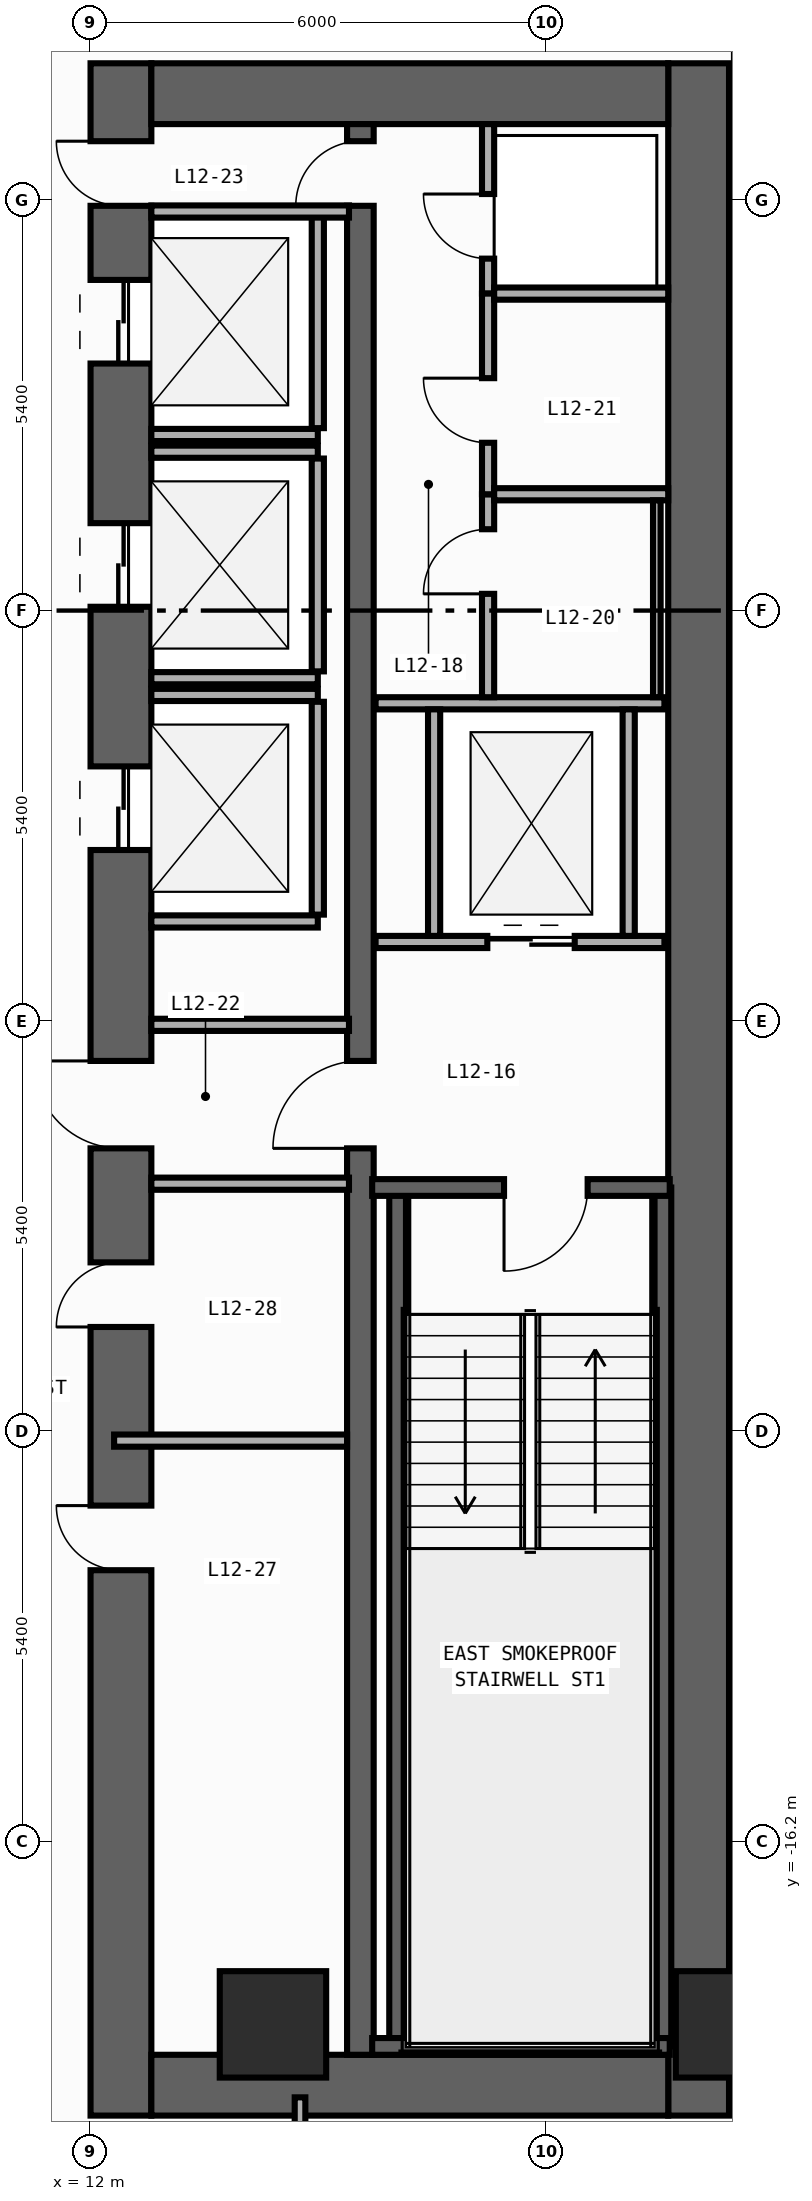
"""IFC4 building model, lengths in metres.
Left out: names, types, materials, properties, quantities, classifications, styles, units other than length and angle.
Written with IfcOpenShell. Run it as: python <this file> out.ifc"""

import sys

from ifc_helpers import new_model, si_unit, direction, frame, frame_2d, origin, origin_2d, place, context, subcontext, project, spatial, rectangle, extrude, element, fill, save


model = new_model("IFC4")
c1 = context("Model", 3, precision=1e-05, world=origin(), true_north=direction((0.0, 1.0)))
c2 = subcontext(c1, "Body", "Model", "MODEL_VIEW")
j1 = project(units=[si_unit("LENGTHUNIT", "METRE"), si_unit("PLANEANGLEUNIT", "RADIAN")], contexts=[c1])
p1 = place(None, origin())
s1 = spatial("IfcSite", under=j1, at=p1, CompositionType="ELEMENT")
p2 = place(p1, origin())
s2 = spatial("IfcBuilding", under=s1, at=p2, CompositionType="ELEMENT")
p3 = place(p2, frame((0.0, 0.0, 51.2)))
s3 = spatial("IfcBuildingStorey", under=s2, at=p3, CompositionType="ELEMENT", Elevation=51.2)
p4 = place(p3, frame((12.4, -19.8, 0.0), z_axis=(0.0, 0.0, 1.0), x_axis=(0.0, 1.0, 0.0)))
e1 = element("IfcWall", 1, at=p4, inside=s3, PredefinedType="SHEAR", context=c2, shape_type="SweptSolid", body=[
    extrude(rectangle(XDim=27.0, YDim=0.8, at=frame_2d((13.5, 0.0))), origin(), (0.0, 0.0, 1.0), 3.94),
])
p5 = place(p4, frame((23.05, 0.0, 0.0)))
e2 = element("IfcOpeningElement", 2, at=p5, cuts=e1, PredefinedType="OPENING", context=c2, shape_type="SweptSolid", body=[
    extrude(rectangle(XDim=1.1, YDim=2.2, at=frame_2d((0.55, 1.1))), frame((0.0, 0.41, 0.0), z_axis=(0.0, -1.0, 0.0), x_axis=(1.0, 0.0, 0.0)), (0.0, 0.0, 1.0), 0.82),
])
p6 = place(p4, frame((19.85, 0.0, 0.0)))
e3 = element("IfcOpeningElement", 3, at=p6, cuts=e1, PredefinedType="OPENING", context=c2, shape_type="SweptSolid", body=[
    extrude(rectangle(XDim=1.1, YDim=2.2, at=frame_2d((0.55, 1.1))), frame((0.0, 0.41, 0.0), z_axis=(0.0, -1.0, 0.0), x_axis=(1.0, 0.0, 0.0)), (0.0, 0.0, 1.0), 0.82),
])
p7 = place(p4, frame((16.65, 0.0, 0.0)))
e4 = element("IfcOpeningElement", 4, at=p7, cuts=e1, PredefinedType="OPENING", context=c2, shape_type="SweptSolid", body=[
    extrude(rectangle(XDim=1.1, YDim=2.2, at=frame_2d((0.55, 1.1))), frame((0.0, 0.41, 0.0), z_axis=(0.0, -1.0, 0.0), x_axis=(1.0, 0.0, 0.0)), (0.0, 0.0, 1.0), 0.82),
])
p8 = place(p4, frame((7.175, 0.0, 0.0)))
e5 = element("IfcOpeningElement", 5, at=p8, cuts=e1, PredefinedType="OPENING", context=c2, shape_type="SweptSolid", body=[
    extrude(rectangle(XDim=0.85, YDim=2.1, at=frame_2d((0.425, 1.05))), frame((0.0, 0.41, 0.0), z_axis=(0.0, -1.0, 0.0), x_axis=(1.0, 0.0, 0.0)), (0.0, 0.0, 1.0), 0.82),
])
p9 = place(p4, frame((10.375, 0.0, 0.0)))
e6 = element("IfcOpeningElement", 6, at=p9, cuts=e1, PredefinedType="OPENING", context=c2, shape_type="SweptSolid", body=[
    extrude(rectangle(XDim=0.85, YDim=2.1, at=frame_2d((0.425, 1.05))), frame((0.0, 0.41, 0.0), z_axis=(0.0, -1.0, 0.0), x_axis=(1.0, 0.0, 0.0)), (0.0, 0.0, 1.0), 0.82),
])
p10 = place(p4, frame((12.725, 0.0, 0.0)))
e7 = element("IfcOpeningElement", 7, at=p10, cuts=e1, PredefinedType="OPENING", context=c2, shape_type="SweptSolid", body=[
    extrude(rectangle(XDim=1.15, YDim=2.2, at=frame_2d((0.575, 1.1))), frame((0.0, 0.41, 0.0), z_axis=(0.0, -1.0, 0.0), x_axis=(1.0, 0.0, 0.0)), (0.0, 0.0, 1.0), 0.82),
])
p11 = place(p4, frame((25.125, 0.0, 0.0)))
e8 = element("IfcOpeningElement", 8, at=p11, cuts=e1, PredefinedType="OPENING", context=c2, shape_type="SweptSolid", body=[
    extrude(rectangle(XDim=0.85, YDim=2.1, at=frame_2d((0.425, 1.05))), frame((0.0, 0.41, 0.0), z_axis=(0.0, -1.0, 0.0), x_axis=(1.0, 0.0, 0.0)), (0.0, 0.0, 1.0), 0.82),
])
p12 = place(p3, frame((20.0, -19.8, 0.0), z_axis=(0.0, 0.0, 1.0), x_axis=(0.0, 1.0, 0.0)))
e9 = element("IfcWall", 9, at=p12, inside=s3, PredefinedType="SHEAR", context=c2, shape_type="SweptSolid", body=[
    extrude(rectangle(XDim=27.0, YDim=0.8, at=frame_2d((13.5, 0.0))), origin(), (0.0, 0.0, 1.0), 3.94),
])
for number, where, z_axis, x_axis in (
    (10, (12.8, -19.4, 0.0), (0.0, 0.0, 1.0), (1.0, 0.0, 0.0)),
    (11, (12.8, 6.8, 0.0), (0.0, 0.0, 1.0), (1.0, 0.0, 0.0)),
):
    element("IfcWall", number, at=place(p3, frame(where, z_axis=z_axis, x_axis=x_axis)), inside=s3, PredefinedType="SHEAR", context=c2, shape_type="SweptSolid", body=[
        extrude(rectangle(XDim=6.8, YDim=0.8, at=frame_2d((3.4, 0.0))), origin(), (0.0, 0.0, 1.0), 3.94),
    ])
p13 = place(p3, frame((15.55, -19.0, 0.0), z_axis=(0.0, 0.0, 1.0), x_axis=(0.0, 1.0, 0.0)))
e12 = element("IfcWall", 12, at=p13, inside=s3, PredefinedType="SHEAR", context=c2, shape_type="SweptSolid", body=[
    extrude(rectangle(XDim=25.4, YDim=0.35, at=frame_2d((12.7, 0.0))), origin(), (0.0, 0.0, 1.0), 3.94),
])
p14 = place(p13, frame((11.925, 0.0, 0.0)))
e13 = element("IfcOpeningElement", 13, at=p14, cuts=e12, PredefinedType="OPENING", context=c2, shape_type="SweptSolid", body=[
    extrude(rectangle(XDim=1.15, YDim=2.2, at=frame_2d((0.575, 1.1))), frame((0.0, 0.185, 0.0), z_axis=(0.0, -1.0, 0.0), x_axis=(1.0, 0.0, 0.0)), (0.0, 0.0, 1.0), 0.37),
])
p15 = place(p13, frame((24.325, 0.0, 0.0)))
e14 = element("IfcOpeningElement", 14, at=p15, cuts=e12, PredefinedType="OPENING", context=c2, shape_type="SweptSolid", body=[
    extrude(rectangle(XDim=0.85, YDim=2.1, at=frame_2d((0.425, 1.05))), frame((0.0, 0.185, 0.0), z_axis=(0.0, -1.0, 0.0), x_axis=(1.0, 0.0, 0.0)), (0.0, 0.0, 1.0), 0.37),
])
for number, where, z_axis, x_axis in (
    (15, (16.04, -18.89, 0.0), (0.0, 0.0, 1.0), (0.0, 1.0, 0.0)),
    (16, (19.53, -18.89, 0.0), (0.0, 0.0, 1.0), (0.0, 1.0, 0.0)),
):
    element("IfcWall", number, at=place(p3, frame(where, z_axis=z_axis, x_axis=x_axis)), inside=s3, PredefinedType="SHEAR", context=c2, shape_type="SweptSolid", body=[
        extrude(rectangle(XDim=11.3, YDim=0.22, at=frame_2d((5.65, 0.0))), origin(), (0.0, 0.0, 1.0), 3.94),
    ])
p16 = place(p3, frame((15.705, -18.89, 0.0), z_axis=(0.0, 0.0, 1.0), x_axis=(1.0, 0.0, 0.0)))
e17 = element("IfcWall", 17, at=p16, inside=s3, PredefinedType="SHEAR", context=c2, shape_type="SweptSolid", body=[
    extrude(rectangle(XDim=3.915, YDim=0.22, at=frame_2d((1.958, 0.0))), origin(), (0.0, 0.0, 1.0), 3.94),
])
p17 = place(p3, frame((19.62, -7.59, 0.0), z_axis=(0.0, 0.0, 1.0), x_axis=(-1.0, 0.0, 0.0)))
e18 = element("IfcWall", 18, at=p17, inside=s3, PredefinedType="SHEAR", context=c2, shape_type="SweptSolid", body=[
    extrude(rectangle(XDim=3.915, YDim=0.22, at=frame_2d((1.958, 0.0))), origin(), (0.0, 0.0, 1.0), 3.94),
])
p18 = place(p17, frame((1.08, 0.0, 0.0)))
e19 = element("IfcOpeningElement", 19, at=p18, cuts=e18, PredefinedType="OPENING", context=c2, shape_type="SweptSolid", body=[
    extrude(rectangle(XDim=1.1, YDim=2.2, at=frame_2d((0.55, 1.1))), frame((0.0, 0.12, 0.0), z_axis=(0.0, -1.0, 0.0), x_axis=(1.0, 0.0, 0.0)), (0.0, 0.0, 1.0), 0.24),
])
for number, where, z_axis, x_axis in (
    (20, (20.4, -18.6, 0.0), (0.0, 0.0, 1.0), (1.0, 0.0, 0.0)),
    (21, (14.4, -18.6, 0.0), (0.0, 0.0, 1.0), (1.0, 0.0, 0.0)),
):
    element("IfcColumn", number, at=place(p3, frame(where, z_axis=z_axis, x_axis=x_axis)), inside=s3, PredefinedType="COLUMN", context=c2, shape_type="SweptSolid", body=[
        extrude(rectangle(XDim=1.4, YDim=1.4, at=origin_2d()), origin(), (0.0, 0.0, 1.0), 4.2),
    ])
p19 = place(p3, frame((12.8, 2.31, 0.0), z_axis=(0.0, 0.0, 1.0), x_axis=(1.0, 0.0, 0.0)))
e22 = element("IfcWall", 22, at=p19, inside=s3, PredefinedType="STANDARD", context=c2, shape_type="SweptSolid", body=[
    extrude(rectangle(XDim=2.19, YDim=0.16, at=frame_2d((1.095, 0.0))), origin(), (0.0, 0.0, 1.0), 3.94),
])
p20 = place(p3, frame((14.99, 2.4, 0.0), z_axis=(0.0, 0.0, 1.0), x_axis=(0.0, 1.0, 0.0)))
e23 = element("IfcWall", 23, at=p20, inside=s3, PredefinedType="STANDARD", context=c2, shape_type="SweptSolid", body=[
    extrude(rectangle(XDim=2.8, YDim=0.16, at=frame_2d((1.4, 0.0))), origin(), (0.0, 0.0, 1.0), 3.94),
])
for number, where, z_axis, x_axis in (
    (24, (12.8, -0.89, 0.0), (0.0, 0.0, 1.0), (1.0, 0.0, 0.0)),
    (25, (12.8, 2.09, 0.0), (0.0, 0.0, 1.0), (1.0, 0.0, 0.0)),
):
    element("IfcWall", number, at=place(p3, frame(where, z_axis=z_axis, x_axis=x_axis)), inside=s3, PredefinedType="STANDARD", context=c2, shape_type="SweptSolid", body=[
        extrude(rectangle(XDim=2.19, YDim=0.16, at=frame_2d((1.095, 0.0))), origin(), (0.0, 0.0, 1.0), 3.94),
    ])
p21 = place(p3, frame((14.99, -0.8, 0.0), z_axis=(0.0, 0.0, 1.0), x_axis=(0.0, 1.0, 0.0)))
e26 = element("IfcWall", 26, at=p21, inside=s3, PredefinedType="STANDARD", context=c2, shape_type="SweptSolid", body=[
    extrude(rectangle(XDim=2.8, YDim=0.16, at=frame_2d((1.4, 0.0))), origin(), (0.0, 0.0, 1.0), 3.94),
])
for number, where, z_axis, x_axis in (
    (27, (12.8, -4.09, 0.0), (0.0, 0.0, 1.0), (1.0, 0.0, 0.0)),
    (28, (12.8, -1.11, 0.0), (0.0, 0.0, 1.0), (1.0, 0.0, 0.0)),
):
    element("IfcWall", number, at=place(p3, frame(where, z_axis=z_axis, x_axis=x_axis)), inside=s3, PredefinedType="STANDARD", context=c2, shape_type="SweptSolid", body=[
        extrude(rectangle(XDim=2.19, YDim=0.16, at=frame_2d((1.095, 0.0))), origin(), (0.0, 0.0, 1.0), 3.94),
    ])
p22 = place(p3, frame((14.99, -4.0, 0.0), z_axis=(0.0, 0.0, 1.0), x_axis=(0.0, 1.0, 0.0)))
e29 = element("IfcWall", 29, at=p22, inside=s3, PredefinedType="STANDARD", context=c2, shape_type="SweptSolid", body=[
    extrude(rectangle(XDim=2.8, YDim=0.16, at=frame_2d((1.4, 0.0))), origin(), (0.0, 0.0, 1.0), 3.94),
])
p23 = place(p3, frame((15.75, -4.36, 0.0), z_axis=(0.0, 0.0, 1.0), x_axis=(1.0, 0.0, 0.0)))
e30 = element("IfcWall", 30, at=p23, inside=s3, PredefinedType="STANDARD", context=c2, shape_type="SweptSolid", body=[
    extrude(rectangle(XDim=3.8, YDim=0.16, at=frame_2d((1.9, 0.0))), origin(), (0.0, 0.0, 1.0), 3.94),
])
p24 = place(p23, frame((1.47, 0.0, 0.0)))
e31 = element("IfcOpeningElement", 31, at=p24, cuts=e30, PredefinedType="OPENING", context=c2, shape_type="SweptSolid", body=[
    extrude(rectangle(XDim=1.15, YDim=2.2, at=frame_2d((0.575, 1.1))), frame((0.0, 0.09, 0.0), z_axis=(0.0, -1.0, 0.0), x_axis=(1.0, 0.0, 0.0)), (0.0, 0.0, 1.0), 0.18),
])
p25 = place(p3, frame((15.75, -1.22, 0.0), z_axis=(0.0, 0.0, 1.0), x_axis=(1.0, 0.0, 0.0)))
e32 = element("IfcWall", 32, at=p25, inside=s3, PredefinedType="STANDARD", context=c2, shape_type="SweptSolid", body=[
    extrude(rectangle(XDim=3.8, YDim=0.16, at=frame_2d((1.9, 0.0))), origin(), (0.0, 0.0, 1.0), 3.94),
])
for number, where, z_axis, x_axis in (
    (33, (16.52, -4.28, 0.0), (0.0, 0.0, 1.0), (0.0, 1.0, 0.0)),
    (34, (19.08, -4.28, 0.0), (0.0, 0.0, 1.0), (0.0, 1.0, 0.0)),
):
    element("IfcWall", number, at=place(p3, frame(where, z_axis=z_axis, x_axis=x_axis)), inside=s3, PredefinedType="STANDARD", context=c2, shape_type="SweptSolid", body=[
        extrude(rectangle(XDim=2.98, YDim=0.16, at=frame_2d((1.49, 0.0))), origin(), (0.0, 0.0, 1.0), 3.94),
    ])
for number, where, z_axis, x_axis in (
    (35, (12.8, -5.45, 0.0), (0.0, 0.0, 1.0), (1.0, 0.0, 0.0)),
    (36, (12.8, -7.54, 0.0), (0.0, 0.0, 1.0), (1.0, 0.0, 0.0)),
    (37, (12.8, 5.25, 0.0), (0.0, 0.0, 1.0), (1.0, 0.0, 0.0)),
):
    element("IfcWall", number, at=place(p3, frame(where, z_axis=z_axis, x_axis=x_axis)), inside=s3, PredefinedType="STANDARD", context=c2, shape_type="SweptSolid", body=[
        extrude(rectangle(XDim=2.6, YDim=0.16, at=frame_2d((1.3, 0.0))), origin(), (0.0, 0.0, 1.0), 3.94),
    ])
p26 = place(p3, frame((17.23, 4.17, 0.0), z_axis=(0.0, 0.0, 1.0), x_axis=(0.0, 1.0, 0.0)))
e38 = element("IfcWall", 38, at=p26, inside=s3, PredefinedType="PARTITIONING", context=c2, shape_type="SweptSolid", body=[
    extrude(rectangle(XDim=2.23, YDim=0.16, at=frame_2d((1.115, 0.0))), origin(), (0.0, 0.0, 1.0), 3.94),
])
p27 = place(p26, frame((0.46, 0.0, 0.0)))
e39 = element("IfcOpeningElement", 39, at=p27, cuts=e38, PredefinedType="OPENING", context=c2, shape_type="SweptSolid", body=[
    extrude(rectangle(XDim=0.85, YDim=2.1, at=frame_2d((0.425, 1.05))), frame((0.0, 0.09, 0.0), z_axis=(0.0, -1.0, 0.0), x_axis=(1.0, 0.0, 0.0)), (0.0, 0.0, 1.0), 0.18),
])
p28 = place(p3, frame((17.23, -1.14, 0.0), z_axis=(0.0, 0.0, 1.0), x_axis=(0.0, 1.0, 0.0)))
e40 = element("IfcWall", 40, at=p28, inside=s3, PredefinedType="PARTITIONING", context=c2, shape_type="SweptSolid", body=[
    extrude(rectangle(XDim=2.67, YDim=0.16, at=frame_2d((1.335, 0.0))), origin(), (0.0, 0.0, 1.0), 3.94),
])
p29 = place(p28, frame((1.36, 0.0, 0.0)))
e41 = element("IfcOpeningElement", 41, at=p29, cuts=e40, PredefinedType="OPENING", context=c2, shape_type="SweptSolid", body=[
    extrude(rectangle(XDim=0.85, YDim=2.1, at=frame_2d((0.425, 1.05))), frame((0.0, 0.09, 0.0), z_axis=(0.0, -1.0, 0.0), x_axis=(1.0, 0.0, 0.0)), (0.0, 0.0, 1.0), 0.18),
])
p30 = place(p3, frame((17.23, 1.53, 0.0), z_axis=(0.0, 0.0, 1.0), x_axis=(0.0, 1.0, 0.0)))
e42 = element("IfcWall", 42, at=p30, inside=s3, PredefinedType="PARTITIONING", context=c2, shape_type="SweptSolid", body=[
    extrude(rectangle(XDim=2.64, YDim=0.16, at=frame_2d((1.32, 0.0))), origin(), (0.0, 0.0, 1.0), 3.94),
])
p31 = place(p30, frame((0.677, 0.0, 0.0)))
e43 = element("IfcOpeningElement", 43, at=p31, cuts=e42, PredefinedType="OPENING", context=c2, shape_type="SweptSolid", body=[
    extrude(rectangle(XDim=0.85, YDim=2.1, at=frame_2d((0.425, 1.05))), frame((0.0, 0.09, 0.0), z_axis=(0.0, -1.0, 0.0), x_axis=(1.0, 0.0, 0.0)), (0.0, 0.0, 1.0), 0.18),
])
for number, where, z_axis, x_axis in (
    (44, (17.31, 4.17, 0.0), (0.0, 0.0, 1.0), (1.0, 0.0, 0.0)),
    (45, (17.31, 1.53, 0.0), (0.0, 0.0, 1.0), (1.0, 0.0, 0.0)),
):
    element("IfcWall", number, at=place(p3, frame(where, z_axis=z_axis, x_axis=x_axis)), inside=s3, PredefinedType="PARTITIONING", context=c2, shape_type="SweptSolid", body=[
        extrude(rectangle(XDim=2.29, YDim=0.16, at=frame_2d((1.145, 0.0))), origin(), (0.0, 0.0, 1.0), 3.94),
    ])
p32 = place(p3, frame((12.31, -10.92, 0.0), z_axis=(0.0, 0.0, 1.0), x_axis=(1.0, 0.0, 0.0)))
e46 = element("IfcWall", 46, at=p32, inside=s3, PredefinedType="PARTITIONING", context=c2, shape_type="SweptSolid", body=[
    extrude(rectangle(XDim=3.065, YDim=0.16, at=frame_2d((1.532, 0.0))), origin(), (0.0, 0.0, 1.0), 3.14),
])
p33 = place(p3, frame((14.756, -26.693, 0.0), z_axis=(0.0, 0.0, 1.0), x_axis=(0.0, 1.0, 0.0)))
e47 = element("IfcWall", 47, at=p33, inside=s3, PredefinedType="PARTITIONING", context=c2, shape_type="SweptSolid", body=[
    extrude(rectangle(XDim=7.133, YDim=0.14, at=frame_2d((3.567, 0.0))), origin(), (0.0, 0.0, 1.0), 3.94),
])
p34 = place(p33, frame((4.586, 0.0, 0.0)))
e48 = element("IfcOpeningElement", 48, at=p34, cuts=e47, PredefinedType="OPENING", context=c2, shape_type="SweptSolid", body=[
    extrude(rectangle(XDim=0.85, YDim=2.1, at=frame_2d((0.425, 1.05))), frame((0.0, 0.08, 0.0), z_axis=(0.0, -1.0, 0.0), x_axis=(1.0, 0.0, 0.0)), (0.0, 0.0, 1.0), 0.16),
])
p35 = place(p3, frame((19.45, 1.45, 0.0), z_axis=(0.0, 0.0, 1.0), x_axis=(0.0, -1.0, 0.0)))
e49 = element("IfcWall", 49, at=p35, inside=s3, PredefinedType="PARTITIONING", context=c2, shape_type="SweptSolid", body=[
    extrude(rectangle(XDim=2.59, YDim=0.1, at=frame_2d((1.295, 0.0))), origin(), (0.0, 0.0, 1.0), 3.94),
])
p36 = place(p18, origin())
e50 = element("IfcDoor", 50, at=p36, inside=s3, OperationType="SINGLE_SWING_RIGHT", PredefinedType="DOOR", context=c2, shape_type="SweptSolid", body=[
    extrude(rectangle(XDim=1.1, YDim=2.2, at=frame_2d((0.55, 1.1))), frame((0.0, 0.025, 0.0), z_axis=(0.0, -1.0, 0.0), x_axis=(1.0, 0.0, 0.0)), (0.0, 0.0, 1.0), 0.05),
])
fill(e19, e50)
p37 = place(p5, origin())
e51 = element("IfcDoor", 51, at=p37, inside=s3, OperationType="DOUBLE_DOOR_SLIDING", PredefinedType="DOOR", context=c2, shape_type="SweptSolid", body=[
    extrude(rectangle(XDim=1.1, YDim=2.2, at=frame_2d((0.55, 1.1))), frame((0.0, 0.025, 0.0), z_axis=(0.0, -1.0, 0.0), x_axis=(1.0, 0.0, 0.0)), (0.0, 0.0, 1.0), 0.05),
])
fill(e2, e51)
p38 = place(p6, origin())
e52 = element("IfcDoor", 52, at=p38, inside=s3, OperationType="DOUBLE_DOOR_SLIDING", PredefinedType="DOOR", context=c2, shape_type="SweptSolid", body=[
    extrude(rectangle(XDim=1.1, YDim=2.2, at=frame_2d((0.55, 1.1))), frame((0.0, 0.025, 0.0), z_axis=(0.0, -1.0, 0.0), x_axis=(1.0, 0.0, 0.0)), (0.0, 0.0, 1.0), 0.05),
])
fill(e3, e52)
p39 = place(p7, origin())
e53 = element("IfcDoor", 53, at=p39, inside=s3, OperationType="DOUBLE_DOOR_SLIDING", PredefinedType="DOOR", context=c2, shape_type="SweptSolid", body=[
    extrude(rectangle(XDim=1.1, YDim=2.2, at=frame_2d((0.55, 1.1))), frame((0.0, 0.025, 0.0), z_axis=(0.0, -1.0, 0.0), x_axis=(1.0, 0.0, 0.0)), (0.0, 0.0, 1.0), 0.05),
])
fill(e4, e53)
p40 = place(p8, origin())
e54 = element("IfcDoor", 54, at=p40, inside=s3, OperationType="SINGLE_SWING_RIGHT", PredefinedType="DOOR", context=c2, shape_type="SweptSolid", body=[
    extrude(rectangle(XDim=0.85, YDim=2.1, at=frame_2d((0.425, 1.05))), frame((0.0, 0.025, 0.0), z_axis=(0.0, -1.0, 0.0), x_axis=(1.0, 0.0, 0.0)), (0.0, 0.0, 1.0), 0.05),
])
fill(e5, e54)
p41 = place(p9, origin())
e55 = element("IfcDoor", 55, at=p41, inside=s3, OperationType="SINGLE_SWING_LEFT", PredefinedType="DOOR", context=c2, shape_type="SweptSolid", body=[
    extrude(rectangle(XDim=0.85, YDim=2.1, at=frame_2d((0.425, 1.05))), frame((0.0, 0.025, 0.0), z_axis=(0.0, -1.0, 0.0), x_axis=(1.0, 0.0, 0.0)), (0.0, 0.0, 1.0), 0.05),
])
fill(e6, e55)
p42 = place(p10, origin())
e56 = element("IfcDoor", 56, at=p42, inside=s3, OperationType="SINGLE_SWING_RIGHT", PredefinedType="DOOR", context=c2, shape_type="SweptSolid", body=[
    extrude(rectangle(XDim=1.15, YDim=2.2, at=frame_2d((0.575, 1.1))), frame((0.0, 0.025, 0.0), z_axis=(0.0, -1.0, 0.0), x_axis=(1.0, 0.0, 0.0)), (0.0, 0.0, 1.0), 0.05),
])
fill(e7, e56)
p43 = place(p14, origin())
e57 = element("IfcDoor", 57, at=p43, inside=s3, OperationType="SINGLE_SWING_LEFT", PredefinedType="DOOR", context=c2, shape_type="SweptSolid", body=[
    extrude(rectangle(XDim=1.15, YDim=2.2, at=frame_2d((0.575, 1.1))), frame((0.0, 0.025, 0.0), z_axis=(0.0, -1.0, 0.0), x_axis=(1.0, 0.0, 0.0)), (0.0, 0.0, 1.0), 0.05),
])
fill(e13, e57)
p44 = place(p11, origin())
e58 = element("IfcDoor", 58, at=p44, inside=s3, OperationType="SINGLE_SWING_RIGHT", PredefinedType="DOOR", context=c2, shape_type="SweptSolid", body=[
    extrude(rectangle(XDim=0.85, YDim=2.1, at=frame_2d((0.425, 1.05))), frame((0.0, 0.025, 0.0), z_axis=(0.0, -1.0, 0.0), x_axis=(1.0, 0.0, 0.0)), (0.0, 0.0, 1.0), 0.05),
])
fill(e8, e58)
p45 = place(p15, origin())
e59 = element("IfcDoor", 59, at=p45, inside=s3, OperationType="SINGLE_SWING_LEFT", PredefinedType="DOOR", context=c2, shape_type="SweptSolid", body=[
    extrude(rectangle(XDim=0.85, YDim=2.1, at=frame_2d((0.425, 1.05))), frame((0.0, 0.025, 0.0), z_axis=(0.0, -1.0, 0.0), x_axis=(1.0, 0.0, 0.0)), (0.0, 0.0, 1.0), 0.05),
])
fill(e14, e59)
p46 = place(p24, origin())
e60 = element("IfcDoor", 60, at=p46, inside=s3, OperationType="DOUBLE_DOOR_SLIDING", PredefinedType="DOOR", context=c2, shape_type="SweptSolid", body=[
    extrude(rectangle(XDim=1.15, YDim=2.2, at=frame_2d((0.575, 1.1))), frame((0.0, 0.025, 0.0), z_axis=(0.0, -1.0, 0.0), x_axis=(1.0, 0.0, 0.0)), (0.0, 0.0, 1.0), 0.05),
])
fill(e31, e60)
p47 = place(p27, origin())
e61 = element("IfcDoor", 61, at=p47, inside=s3, OperationType="SINGLE_SWING_RIGHT", PredefinedType="DOOR", context=c2, shape_type="SweptSolid", body=[
    extrude(rectangle(XDim=0.85, YDim=2.1, at=frame_2d((0.425, 1.05))), frame((0.0, 0.025, 0.0), z_axis=(0.0, -1.0, 0.0), x_axis=(1.0, 0.0, 0.0)), (0.0, 0.0, 1.0), 0.05),
])
fill(e39, e61)
p48 = place(p29, origin())
e62 = element("IfcDoor", 62, at=p48, inside=s3, OperationType="SINGLE_SWING_LEFT", PredefinedType="DOOR", context=c2, shape_type="SweptSolid", body=[
    extrude(rectangle(XDim=0.85, YDim=2.1, at=frame_2d((0.425, 1.05))), frame((0.0, 0.025, 0.0), z_axis=(0.0, -1.0, 0.0), x_axis=(1.0, 0.0, 0.0)), (0.0, 0.0, 1.0), 0.05),
])
fill(e41, e62)
p49 = place(p31, origin())
e63 = element("IfcDoor", 63, at=p49, inside=s3, OperationType="SINGLE_SWING_RIGHT", PredefinedType="DOOR", context=c2, shape_type="SweptSolid", body=[
    extrude(rectangle(XDim=0.85, YDim=2.1, at=frame_2d((0.425, 1.05))), frame((0.0, 0.025, 0.0), z_axis=(0.0, -1.0, 0.0), x_axis=(1.0, 0.0, 0.0)), (0.0, 0.0, 1.0), 0.05),
])
fill(e43, e63)
save(model, sys.argv[1])
